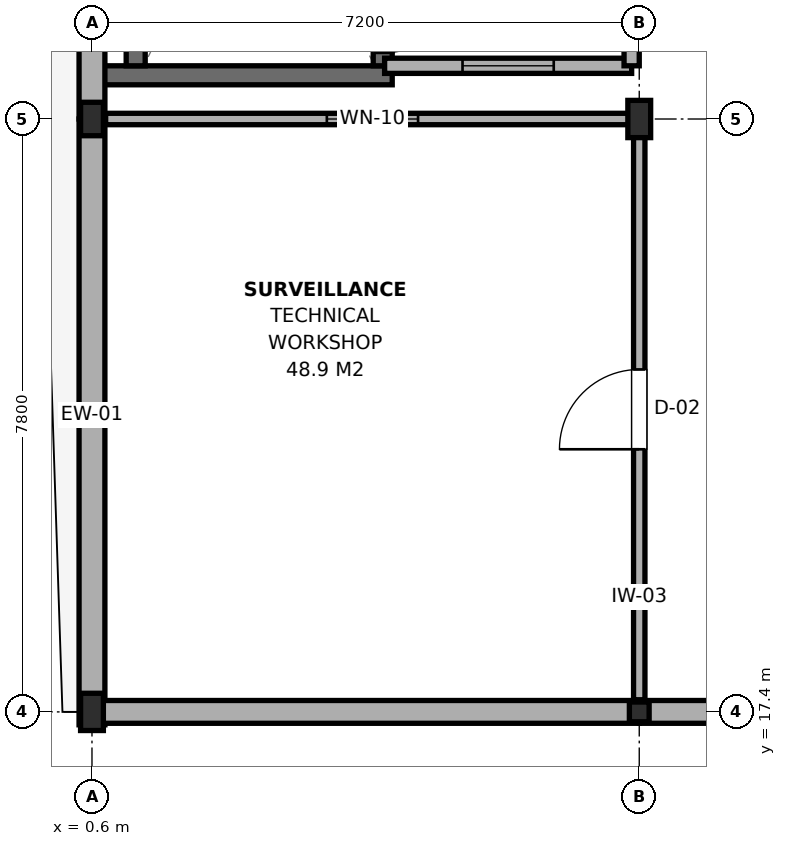
"""IFC4 building model, lengths in metres.
Left out: names, types, materials, properties, quantities, classifications, styles, units other than length and angle.
Written with IfcOpenShell. Run it as: python <this file> out.ifc"""

import sys

from ifc_helpers import new_model, si_unit, direction, frame, frame_2d, origin, origin_2d, place, context, subcontext, project, spatial, rectangle, i_section, extrude, element, fill, save


model = new_model("IFC4")
c1 = context("Model", 3, precision=1e-05, world=origin(), true_north=direction((0.0, 1.0)))
c2 = subcontext(c1, "Body", "Model", "MODEL_VIEW")
j1 = project(units=[si_unit("LENGTHUNIT", "METRE"), si_unit("PLANEANGLEUNIT", "RADIAN")], contexts=[c1])
p1 = place(None, origin())
s1 = spatial("IfcSite", under=j1, at=p1, CompositionType="ELEMENT")
p2 = place(p1, origin())
s2 = spatial("IfcBuilding", under=s1, at=p2, CompositionType="ELEMENT")
p3 = place(p2, frame((0.0, 0.0, 24.9)))
s3 = spatial("IfcBuildingStorey", under=s2, at=p3, CompositionType="ELEMENT", Elevation=24.9)
p4 = place(p3, frame((0.6, 17.4, 0.0), z_axis=(0.0, 0.0, 1.0), x_axis=(1.0, 0.0, 0.0)))
e1 = element("IfcColumn", 1, at=p4, inside=s3, PredefinedType="COLUMN", context=c2, shape_type="SweptSolid", body=[
    extrude(i_section(OverallWidth=0.3, OverallDepth=0.49, WebThickness=0.012, FlangeThickness=0.023, FilletRadius=0.027, at=origin_2d()), origin(), (0.0, 0.0, 1.0), 3.9),
])
p5 = place(p3, frame((0.6, 25.2, 0.0), z_axis=(0.0, 0.0, 1.0), x_axis=(1.0, 0.0, 0.0)))
e2 = element("IfcColumn", 2, at=p5, inside=s3, PredefinedType="COLUMN", context=c2, shape_type="SweptSolid", body=[
    extrude(i_section(OverallWidth=0.3, OverallDepth=0.44, WebThickness=0.011, FlangeThickness=0.021, FilletRadius=0.027, at=origin_2d()), origin(), (0.0, 0.0, 1.0), 3.9),
])
p6 = place(p3, frame((7.8, 17.4, 0.0), z_axis=(0.0, 0.0, 1.0), x_axis=(1.0, 0.0, 0.0)))
e3 = element("IfcColumn", 3, at=p6, inside=s3, PredefinedType="COLUMN", context=c2, shape_type="SweptSolid", body=[
    extrude(i_section(OverallWidth=0.26, OverallDepth=0.26, WebThickness=0.01, FlangeThickness=0.018, FilletRadius=0.024, at=origin_2d()), origin(), (0.0, 0.0, 1.0), 3.9),
])
p7 = place(p3, frame((7.8, 25.2, 0.0), z_axis=(0.0, 0.0, 1.0), x_axis=(1.0, 0.0, 0.0)))
e4 = element("IfcColumn", 4, at=p7, inside=s3, PredefinedType="COLUMN", context=c2, shape_type="SweptSolid", body=[
    extrude(i_section(OverallWidth=0.3, OverallDepth=0.49, WebThickness=0.012, FlangeThickness=0.023, FilletRadius=0.027, at=origin_2d()), origin(), (0.0, 0.0, 1.0), 3.9),
])
p8 = place(p3, frame((0.75, 25.775, 0.0), z_axis=(0.0, 0.0, 1.0), x_axis=(1.0, 0.0, 0.0)))
e5 = element("IfcWall", 5, at=p8, inside=s3, PredefinedType="SHEAR", context=c2, shape_type="SweptSolid", body=[
    extrude(rectangle(XDim=3.8, YDim=0.25, at=frame_2d((1.9, 0.0))), origin(), (0.0, 0.0, 1.0), 3.72),
])
p9 = place(p3, frame((1.175, 25.9, 0.0), z_axis=(0.0, 0.0, 1.0), x_axis=(0.0, 1.0, 0.0)))
e6 = element("IfcWall", 6, at=p9, inside=s3, PredefinedType="SHEAR", context=c2, shape_type="SweptSolid", body=[
    extrude(rectangle(XDim=6.4, YDim=0.25, at=frame_2d((3.2, 0.0))), origin(), (0.0, 0.0, 1.0), 3.72),
])
p10 = place(p3, frame((4.425, 25.9, 0.0), z_axis=(0.0, 0.0, 1.0), x_axis=(0.0, 1.0, 0.0)))
e7 = element("IfcWall", 7, at=p10, inside=s3, PredefinedType="SHEAR", context=c2, shape_type="SweptSolid", body=[
    extrude(rectangle(XDim=6.4, YDim=0.25, at=frame_2d((3.2, 0.0))), origin(), (0.0, 0.0, 1.0), 3.72),
])
p11 = place(p10, frame((0.17, 0.0, 0.0)))
e8 = element("IfcOpeningElement", 8, at=p11, cuts=e7, PredefinedType="OPENING", context=c2, shape_type="SweptSolid", body=[
    extrude(rectangle(XDim=1.1, YDim=2.15, at=frame_2d((0.55, 1.075))), frame((0.0, 0.14, 0.0), z_axis=(0.0, -1.0, 0.0), x_axis=(1.0, 0.0, 0.0)), (0.0, 0.0, 1.0), 0.28),
])
p12 = place(p3, frame((0.6, 17.23, 0.0), z_axis=(0.0, 0.0, 1.0), x_axis=(0.0, 1.0, 0.0)))
e9 = element("IfcWall", 9, at=p12, inside=s3, PredefinedType="SOLIDWALL", context=c2, shape_type="SweptSolid", body=[
    extrude(rectangle(XDim=7.97, YDim=0.34, at=frame_2d((3.985, 0.0))), origin(), (0.0, 0.0, 1.0), 3.115),
])
p13 = place(p3, frame((0.6, 25.2, 0.0), z_axis=(0.0, 0.0, 1.0), x_axis=(0.0, 1.0, 0.0)))
e10 = element("IfcWall", 10, at=p13, inside=s3, PredefinedType="SOLIDWALL", context=c2, shape_type="SweptSolid", body=[
    extrude(rectangle(XDim=5.6, YDim=0.34, at=frame_2d((2.8, 0.0))), origin(), (0.0, 0.0, 1.0), 3.115),
])
p14 = place(p3, frame((0.45, 17.4, 0.0), z_axis=(0.0, 0.0, 1.0), x_axis=(1.0, 0.0, 0.0)))
e11 = element("IfcWall", 11, at=p14, inside=s3, PredefinedType="SOLIDWALL", context=c2, shape_type="SweptSolid", body=[
    extrude(rectangle(XDim=7.35, YDim=0.3, at=frame_2d((3.675, 0.0))), origin(), (0.0, 0.0, 1.0), 3.165),
])
p15 = place(p3, frame((7.8, 17.4, 0.0), z_axis=(0.0, 0.0, 1.0), x_axis=(1.0, 0.0, 0.0)))
e12 = element("IfcWall", 12, at=p15, inside=s3, PredefinedType="SOLIDWALL", context=c2, shape_type="SweptSolid", body=[
    extrude(rectangle(XDim=7.2, YDim=0.3, at=frame_2d((3.6, 0.0))), origin(), (0.0, 0.0, 1.0), 3.165),
])
p16 = place(p15, frame((2.7, 0.0, 0.65)))
e13 = element("IfcOpeningElement", 13, at=p16, cuts=e12, PredefinedType="OPENING", context=c2, shape_type="SweptSolid", body=[
    extrude(rectangle(XDim=1.8, YDim=1.2, at=frame_2d((0.9, 0.6))), frame((0.0, 0.165, 0.0), z_axis=(0.0, -1.0, 0.0), x_axis=(1.0, 0.0, 0.0)), (0.0, 0.0, 1.0), 0.33),
])
p17 = place(p3, frame((4.45, 25.9, 0.0), z_axis=(0.0, 0.0, 1.0), x_axis=(1.0, 0.0, 0.0)))
e14 = element("IfcWall", 14, at=p17, inside=s3, PredefinedType="PARTITIONING", context=c2, shape_type="SweptSolid", body=[
    extrude(rectangle(XDim=3.25, YDim=0.2, at=frame_2d((1.625, 0.0))), origin(), (0.0, 0.0, 1.0), 3.215),
])
p18 = place(p17, frame((1.025, 0.0, 0.95)))
e15 = element("IfcOpeningElement", 15, at=p18, cuts=e14, PredefinedType="OPENING", context=c2, shape_type="SweptSolid", body=[
    extrude(rectangle(XDim=1.2, YDim=1.5, at=frame_2d((0.6, 0.75))), frame((0.0, 0.115, 0.0), z_axis=(0.0, -1.0, 0.0), x_axis=(1.0, 0.0, 0.0)), (0.0, 0.0, 1.0), 0.23),
])
p19 = place(p3, frame((7.7, 25.9, 0.0), z_axis=(0.0, 0.0, 1.0), x_axis=(0.0, 1.0, 0.0)))
e16 = element("IfcWall", 16, at=p19, inside=s3, PredefinedType="PARTITIONING", context=c2, shape_type="SweptSolid", body=[
    extrude(rectangle(XDim=3.6, YDim=0.2, at=frame_2d((1.8, 0.0))), origin(), (0.0, 0.0, 1.0), 3.215),
])
p20 = place(p19, frame((1.25, 0.0, 0.0)))
e17 = element("IfcOpeningElement", 17, at=p20, cuts=e16, PredefinedType="OPENING", context=c2, shape_type="SweptSolid", body=[
    extrude(rectangle(XDim=1.1, YDim=2.15, at=frame_2d((0.55, 1.075))), frame((0.0, 0.115, 0.0), z_axis=(0.0, -1.0, 0.0), x_axis=(1.0, 0.0, 0.0)), (0.0, 0.0, 1.0), 0.23),
])
p21 = place(p3, frame((7.8, 17.56, 0.0), z_axis=(0.0, 0.0, 1.0), x_axis=(0.0, 1.0, 0.0)))
e18 = element("IfcWall", 18, at=p21, inside=s3, PredefinedType="PARTITIONING", context=c2, shape_type="SweptSolid", body=[
    extrude(rectangle(XDim=7.64, YDim=0.15, at=frame_2d((3.82, 0.0))), origin(), (0.0, 0.0, 1.0), 3.165),
])
p22 = place(p21, frame((3.295, 0.0, 0.0)))
e19 = element("IfcOpeningElement", 19, at=p22, cuts=e18, PredefinedType="OPENING", context=c2, shape_type="SweptSolid", body=[
    extrude(rectangle(XDim=1.05, YDim=2.15, at=frame_2d((0.525, 1.075))), frame((0.0, 0.09, 0.0), z_axis=(0.0, -1.0, 0.0), x_axis=(1.0, 0.0, 0.0)), (0.0, 0.0, 1.0), 0.18),
])
p23 = place(p3, frame((0.78, 25.2, 0.0), z_axis=(0.0, 0.0, 1.0), x_axis=(1.0, 0.0, 0.0)))
e20 = element("IfcWall", 20, at=p23, inside=s3, PredefinedType="PARTITIONING", context=c2, shape_type="SweptSolid", body=[
    extrude(rectangle(XDim=7.02, YDim=0.15, at=frame_2d((3.51, 0.0))), origin(), (0.0, 0.0, 1.0), 3.365),
])
p24 = place(p23, frame((2.91, 0.0, 0.95)))
e21 = element("IfcOpeningElement", 21, at=p24, cuts=e20, PredefinedType="OPENING", context=c2, shape_type="SweptSolid", body=[
    extrude(rectangle(XDim=1.2, YDim=1.5, at=frame_2d((0.6, 0.75))), frame((0.0, 0.09, 0.0), z_axis=(0.0, -1.0, 0.0), x_axis=(1.0, 0.0, 0.0)), (0.0, 0.0, 1.0), 0.18),
])
p25 = place(p11, frame((1.1, 0.0, 0.0), z_axis=(0.0, 0.0, 1.0), x_axis=(-1.0, 0.0, 0.0)))
e22 = element("IfcDoor", 22, at=p25, inside=s3, OperationType="SINGLE_SWING_LEFT", PredefinedType="DOOR", context=c2, shape_type="SweptSolid", body=[
    extrude(rectangle(XDim=1.1, YDim=2.15, at=frame_2d((0.55, 1.075))), frame((0.0, 0.025, 0.0), z_axis=(0.0, -1.0, 0.0), x_axis=(1.0, 0.0, 0.0)), (0.0, 0.0, 1.0), 0.05),
])
fill(e8, e22)
p26 = place(p18, origin())
e23 = element("IfcWindow", 23, at=p26, inside=s3, PartitioningType="SINGLE_PANEL", PredefinedType="WINDOW", context=c2, shape_type="SweptSolid", body=[
    extrude(rectangle(XDim=1.2, YDim=1.5, at=frame_2d((0.6, 0.75))), frame((0.0, 0.03, 0.0), z_axis=(0.0, -1.0, 0.0), x_axis=(1.0, 0.0, 0.0)), (0.0, 0.0, 1.0), 0.06),
])
fill(e15, e23)
p27 = place(p22, origin())
e24 = element("IfcDoor", 24, at=p27, inside=s3, OperationType="SINGLE_SWING_LEFT", PredefinedType="DOOR", context=c2, shape_type="SweptSolid", body=[
    extrude(rectangle(XDim=1.05, YDim=2.15, at=frame_2d((0.525, 1.075))), frame((0.0, 0.025, 0.0), z_axis=(0.0, -1.0, 0.0), x_axis=(1.0, 0.0, 0.0)), (0.0, 0.0, 1.0), 0.05),
])
fill(e19, e24)
p28 = place(p24, origin())
e25 = element("IfcWindow", 25, at=p28, inside=s3, PartitioningType="SINGLE_PANEL", PredefinedType="WINDOW", context=c2, shape_type="SweptSolid", body=[
    extrude(rectangle(XDim=1.2, YDim=1.5, at=frame_2d((0.6, 0.75))), frame((0.0, 0.03, 0.0), z_axis=(0.0, -1.0, 0.0), x_axis=(1.0, 0.0, 0.0)), (0.0, 0.0, 1.0), 0.06),
])
fill(e21, e25)
save(model, sys.argv[1])
